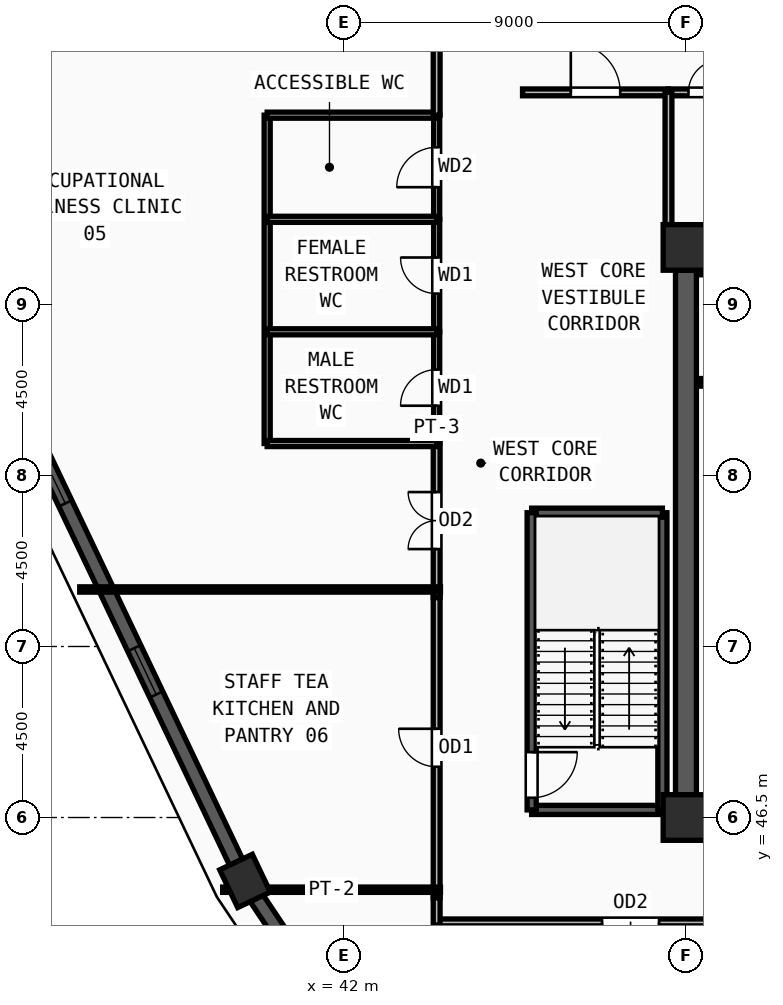
"""IFC4 building model, lengths in metres.
Left out: names, types, materials, properties, quantities, classifications, styles, units other than length and angle.
Written with IfcOpenShell. Run it as: python <this file> out.ifc"""

import sys

from ifc_helpers import new_model, si_unit, direction, frame, frame_2d, origin, origin_2d, place, context, subcontext, project, spatial, rectangle, extrude, source, transform, mapped, element, fill, save


model = new_model("IFC4")
c1 = context("Model", 3, precision=1e-05, world=origin(), true_north=direction((0.0, 1.0)))
c2 = subcontext(c1, "Body", "Model", "MODEL_VIEW")
j1 = project(units=[si_unit("LENGTHUNIT", "METRE"), si_unit("PLANEANGLEUNIT", "RADIAN")], contexts=[c1])
p1 = place(None, origin())
s1 = spatial("IfcSite", under=j1, at=p1, CompositionType="ELEMENT")
p2 = place(p1, origin())
s2 = spatial("IfcBuilding", under=s1, at=p2, CompositionType="ELEMENT")
p3 = place(p2, frame((0.0, 0.0, 286.5)))
s3 = spatial("IfcBuildingStorey", under=s2, at=p3, CompositionType="ELEMENT", Elevation=286.5)
m1 = source(origin(), c2, "Body", "SweptSolid", [
    extrude(rectangle(XDim=1.2, YDim=1.2, at=origin_2d()), origin(), (0.0, 0.0, 1.0), 3.75),
])
for number, where, z_axis, x_axis in (
    (1, (51.0, 46.5, 0.0), (0.0, 0.0, 1.0), (1.0, 0.0, 0.0)),
    (2, (51.0, 61.5, 0.0), (0.0, 0.0, 1.0), (1.0, 0.0, 0.0)),
):
    element("IfcColumn", number, at=place(p3, frame(where, z_axis=z_axis, x_axis=x_axis)), inside=s3, PredefinedType="COLUMN", context=c2, shape_type="MappedRepresentation", body=[
        mapped(m1, transform((0.0, 0.0, 0.0), x_axis=(1.0, 0.0, 0.0), y_axis=(0.0, 1.0, 0.0), z_axis=(0.0, 0.0, 1.0), scale=1.0)),
    ])
m2 = source(origin(), c2, "Body", "SweptSolid", [
    extrude(rectangle(XDim=1.1, YDim=0.95, at=origin_2d()), origin(), (0.0, 0.0, 1.0), 3.75),
])
p4 = place(p3, frame((39.397, 44.831, 0.0), z_axis=(0.0, 0.0, 1.0), x_axis=(-0.429880868547, 0.902885617815, 0.0)))
e3 = element("IfcColumn", 3, at=p4, inside=s3, PredefinedType="COLUMN", context=c2, shape_type="MappedRepresentation", body=[
    mapped(m2, transform((0.0, 0.0, 0.0), x_axis=(1.0, 0.0, 0.0), y_axis=(0.0, 1.0, 0.0), z_axis=(0.0, 0.0, 1.0), scale=1.0)),
])
p5 = place(p3, frame((29.59, 65.429, 0.0), z_axis=(0.0, 0.0, 1.0), x_axis=(0.429890605998, -0.902880981567, 0.0)))
e4 = element("IfcWall", 4, at=p5, inside=s3, PredefinedType="SOLIDWALL", context=c2, shape_type="SweptSolid", body=[
    extrude(rectangle(XDim=22.273, YDim=0.38, at=frame_2d((11.136, 0.0))), origin(), (0.0, 0.0, 1.0), 3.57),
])
m3 = source(origin(), c2, "Body", "SweptSolid", [
    extrude(rectangle(XDim=1.35, YDim=1.85, at=frame_2d((0.675, 0.925))), frame((0.0, 0.2, 0.0), z_axis=(0.0, -1.0, 0.0), x_axis=(1.0, 0.0, 0.0)), (0.0, 0.0, 1.0), 0.4),
])
p6 = place(p5, frame((4.893, 0.0, 0.55)))
e5 = element("IfcOpeningElement", 5, at=p6, cuts=e4, PredefinedType="OPENING", context=c2, shape_type="MappedRepresentation", body=[
    mapped(m3, transform((0.0, 0.0, 0.0), x_axis=(1.0, 0.0, 0.0), y_axis=(0.0, 1.0, 0.0), z_axis=(0.0, 0.0, 1.0), scale=1.0)),
])
p7 = place(p5, frame((10.462, 0.0, 0.55)))
e6 = element("IfcOpeningElement", 6, at=p7, cuts=e4, PredefinedType="OPENING", context=c2, shape_type="MappedRepresentation", body=[
    mapped(m3, transform((0.0, 0.0, 0.0), x_axis=(1.0, 0.0, 0.0), y_axis=(0.0, 1.0, 0.0), z_axis=(0.0, 0.0, 1.0), scale=1.0)),
])
p8 = place(p5, frame((16.03, 0.0, 0.55)))
e7 = element("IfcOpeningElement", 7, at=p8, cuts=e4, PredefinedType="OPENING", context=c2, shape_type="MappedRepresentation", body=[
    mapped(m3, transform((0.0, 0.0, 0.0), x_axis=(1.0, 0.0, 0.0), y_axis=(0.0, 1.0, 0.0), z_axis=(0.0, 0.0, 1.0), scale=1.0)),
])
p9 = place(p3, frame((39.697, 44.382, 0.0), z_axis=(0.0, 0.0, 1.0), x_axis=(0.556246250685, -0.831017514014, 0.0)))
e8 = element("IfcWall", 8, at=p9, inside=s3, PredefinedType="SOLIDWALL", context=c2, shape_type="SweptSolid", body=[
    extrude(rectangle(XDim=26.986, YDim=0.38, at=frame_2d((13.493, 0.0))), origin(), (0.0, 0.0, 1.0), 3.57),
])
p10 = place(p9, frame((6.072, 0.0, 0.55)))
e9 = element("IfcOpeningElement", 9, at=p10, cuts=e8, PredefinedType="OPENING", context=c2, shape_type="MappedRepresentation", body=[
    mapped(m3, transform((0.0, 0.0, 0.0), x_axis=(1.0, 0.0, 0.0), y_axis=(0.0, 1.0, 0.0), z_axis=(0.0, 0.0, 1.0), scale=1.0)),
])
p11 = place(p9, frame((12.818, 0.0, 0.55)))
e10 = element("IfcOpeningElement", 10, at=p11, cuts=e8, PredefinedType="OPENING", context=c2, shape_type="MappedRepresentation", body=[
    mapped(m3, transform((0.0, 0.0, 0.0), x_axis=(1.0, 0.0, 0.0), y_axis=(0.0, 1.0, 0.0), z_axis=(0.0, 0.0, 1.0), scale=1.0)),
])
p12 = place(p9, frame((19.565, 0.0, 0.55)))
e11 = element("IfcOpeningElement", 11, at=p12, cuts=e8, PredefinedType="OPENING", context=c2, shape_type="MappedRepresentation", body=[
    mapped(m3, transform((0.0, 0.0, 0.0), x_axis=(1.0, 0.0, 0.0), y_axis=(0.0, 1.0, 0.0), z_axis=(0.0, 0.0, 1.0), scale=1.0)),
])
p13 = place(p3, frame((51.0, 47.1, 0.0), z_axis=(0.0, 0.0, 1.0), x_axis=(0.0, 1.0, 0.0)))
e12 = element("IfcWall", 12, at=p13, inside=s3, PredefinedType="SHEAR", context=c2, shape_type="SweptSolid", body=[
    extrude(rectangle(XDim=13.8, YDim=0.55, at=frame_2d((6.9, 0.0))), origin(), (0.0, 0.0, 1.0), 3.57),
])
p14 = place(p3, frame((46.94, 46.7, 0.0), z_axis=(0.0, 0.0, 1.0), x_axis=(1.0, 0.0, 0.0)))
e13 = element("IfcWall", 13, at=p14, inside=s3, PredefinedType="SOLIDWALL", context=c2, shape_type="SweptSolid", body=[
    extrude(rectangle(XDim=3.44, YDim=0.24, at=frame_2d((1.72, 0.0))), origin(), (0.0, 0.0, 1.0), 3.57),
])
p15 = place(p3, frame((50.38, 46.7, 0.0), z_axis=(0.0, 0.0, 1.0), x_axis=(0.0, 1.0, 0.0)))
e14 = element("IfcWall", 14, at=p15, inside=s3, PredefinedType="SOLIDWALL", context=c2, shape_type="SweptSolid", body=[
    extrude(rectangle(XDim=7.82, YDim=0.24, at=frame_2d((3.91, 0.0))), origin(), (0.0, 0.0, 1.0), 3.57),
])
p16 = place(p3, frame((50.38, 54.52, 0.0), z_axis=(0.0, 0.0, 1.0), x_axis=(-1.0, 0.0, 0.0)))
e15 = element("IfcWall", 15, at=p16, inside=s3, PredefinedType="SOLIDWALL", context=c2, shape_type="SweptSolid", body=[
    extrude(rectangle(XDim=3.44, YDim=0.24, at=frame_2d((1.72, 0.0))), origin(), (0.0, 0.0, 1.0), 3.57),
])
p17 = place(p3, frame((46.94, 54.52, 0.0), z_axis=(0.0, 0.0, 1.0), x_axis=(0.0, -1.0, 0.0)))
e16 = element("IfcWall", 16, at=p17, inside=s3, PredefinedType="SOLIDWALL", context=c2, shape_type="SweptSolid", body=[
    extrude(rectangle(XDim=7.82, YDim=0.24, at=frame_2d((3.91, 0.0))), origin(), (0.0, 0.0, 1.0), 3.57),
])
m4 = source(origin(), c2, "Body", "SweptSolid", [
    extrude(rectangle(XDim=1.2, YDim=2.2, at=frame_2d((0.6, 1.1))), frame((0.0, 0.13, 0.0), z_axis=(0.0, -1.0, 0.0), x_axis=(1.0, 0.0, 0.0)), (0.0, 0.0, 1.0), 0.26),
])
p18 = place(p17, frame((6.3, 0.0, 0.0)))
e17 = element("IfcOpeningElement", 17, at=p18, cuts=e16, PredefinedType="OPENING", context=c2, shape_type="MappedRepresentation", body=[
    mapped(m4, transform((0.0, 0.0, 0.0), x_axis=(1.0, 0.0, 0.0), y_axis=(0.0, 1.0, 0.0), z_axis=(0.0, 0.0, 1.0), scale=1.0)),
])
for number, where, z_axis, x_axis in (
    (18, (51.4, 57.95, 0.0), (0.0, 0.0, 1.0), (1.0, 0.0, 0.0)),
    (19, (53.8, 60.88, 0.0), (0.0, 0.0, 1.0), (-1.0, 0.0, 0.0)),
):
    element("IfcWall", number, at=place(p3, frame(where, z_axis=z_axis, x_axis=x_axis)), inside=s3, PredefinedType="SOLIDWALL", context=c2, shape_type="SweptSolid", body=[
        extrude(rectangle(XDim=2.4, YDim=0.2, at=frame_2d((1.2, 0.0))), origin(), (0.0, 0.0, 1.0), 3.57),
    ])
p19 = place(p3, frame((44.44, 56.34, 0.0), z_axis=(0.0, 0.0, 1.0), x_axis=(0.0, 1.0, 0.0)))
e20 = element("IfcWall", 20, at=p19, inside=s3, PredefinedType="PARTITIONING", context=c2, shape_type="SweptSolid", body=[
    extrude(rectangle(XDim=2.94, YDim=0.16, at=frame_2d((1.47, 0.0))), origin(), (0.0, 0.0, 1.0), 3.57),
])
m5 = source(origin(), c2, "Body", "SweptSolid", [
    extrude(rectangle(XDim=0.95, YDim=2.15, at=frame_2d((0.475, 1.075))), frame((0.0, 0.09, 0.0), z_axis=(0.0, -1.0, 0.0), x_axis=(1.0, 0.0, 0.0)), (0.0, 0.0, 1.0), 0.18),
])
p20 = place(p19, frame((0.995, 0.0, 0.0)))
e21 = element("IfcOpeningElement", 21, at=p20, cuts=e20, PredefinedType="OPENING", context=c2, shape_type="MappedRepresentation", body=[
    mapped(m5, transform((0.0, 0.0, 0.0), x_axis=(1.0, 0.0, 0.0), y_axis=(0.0, 1.0, 0.0), z_axis=(0.0, 0.0, 1.0), scale=1.0)),
])
p21 = place(p3, frame((44.44, 59.28, 0.0), z_axis=(0.0, 0.0, 1.0), x_axis=(0.0, 1.0, 0.0)))
e22 = element("IfcWall", 22, at=p21, inside=s3, PredefinedType="PARTITIONING", context=c2, shape_type="SweptSolid", body=[
    extrude(rectangle(XDim=2.96, YDim=0.16, at=frame_2d((1.48, 0.0))), origin(), (0.0, 0.0, 1.0), 3.57),
])
p22 = place(p21, frame((1.005, 0.0, 0.0)))
e23 = element("IfcOpeningElement", 23, at=p22, cuts=e22, PredefinedType="OPENING", context=c2, shape_type="MappedRepresentation", body=[
    mapped(m5, transform((0.0, 0.0, 0.0), x_axis=(1.0, 0.0, 0.0), y_axis=(0.0, 1.0, 0.0), z_axis=(0.0, 0.0, 1.0), scale=1.0)),
])
p23 = place(p3, frame((44.44, 62.24, 0.0), z_axis=(0.0, 0.0, 1.0), x_axis=(0.0, 1.0, 0.0)))
e24 = element("IfcWall", 24, at=p23, inside=s3, PredefinedType="PARTITIONING", context=c2, shape_type="SweptSolid", body=[
    extrude(rectangle(XDim=2.74, YDim=0.16, at=frame_2d((1.37, 0.0))), origin(), (0.0, 0.0, 1.0), 3.57),
])
m6 = source(origin(), c2, "Body", "SweptSolid", [
    extrude(rectangle(XDim=1.05, YDim=2.15, at=frame_2d((0.525, 1.075))), frame((0.0, 0.09, 0.0), z_axis=(0.0, -1.0, 0.0), x_axis=(1.0, 0.0, 0.0)), (0.0, 0.0, 1.0), 0.18),
])
p24 = place(p23, frame((0.845, 0.0, 0.0)))
e25 = element("IfcOpeningElement", 25, at=p24, cuts=e24, PredefinedType="OPENING", context=c2, shape_type="MappedRepresentation", body=[
    mapped(m6, transform((0.0, 0.0, 0.0), x_axis=(1.0, 0.0, 0.0), y_axis=(0.0, 1.0, 0.0), z_axis=(0.0, 0.0, 1.0), scale=1.0)),
])
p25 = place(p3, frame((50.54, 65.58, 0.0), z_axis=(0.0, 0.0, 1.0), x_axis=(1.0, 0.0, 0.0)))
e26 = element("IfcWall", 26, at=p25, inside=s3, PredefinedType="PARTITIONING", context=c2, shape_type="SweptSolid", body=[
    extrude(rectangle(XDim=1.9, YDim=0.18, at=frame_2d((0.95, 0.0))), origin(), (0.0, 0.0, 1.0), 3.57),
])
m7 = source(origin(), c2, "Body", "SweptSolid", [
    extrude(rectangle(XDim=0.85, YDim=2.1, at=frame_2d((0.425, 1.05))), frame((0.0, 0.1, 0.0), z_axis=(0.0, -1.0, 0.0), x_axis=(1.0, 0.0, 0.0)), (0.0, 0.0, 1.0), 0.2),
])
p26 = place(p25, frame((0.525, 0.0, 0.0)))
e27 = element("IfcOpeningElement", 27, at=p26, cuts=e26, PredefinedType="OPENING", context=c2, shape_type="MappedRepresentation", body=[
    mapped(m7, transform((0.0, 0.0, 0.0), x_axis=(1.0, 0.0, 0.0), y_axis=(0.0, 1.0, 0.0), z_axis=(0.0, 0.0, 1.0), scale=1.0)),
])
p27 = place(p3, frame((46.7, 65.58, 0.0), z_axis=(0.0, 0.0, 1.0), x_axis=(1.0, 0.0, 0.0)))
e28 = element("IfcWall", 28, at=p27, inside=s3, PredefinedType="PARTITIONING", context=c2, shape_type="SweptSolid", body=[
    extrude(rectangle(XDim=3.84, YDim=0.18, at=frame_2d((1.92, 0.0))), origin(), (0.0, 0.0, 1.0), 3.57),
])
m8 = source(origin(), c2, "Body", "SweptSolid", [
    extrude(rectangle(XDim=1.3, YDim=2.2, at=frame_2d((0.65, 1.1))), frame((0.0, 0.1, 0.0), z_axis=(0.0, -1.0, 0.0), x_axis=(1.0, 0.0, 0.0)), (0.0, 0.0, 1.0), 0.2),
])
p28 = place(p27, frame((1.27, 0.0, 0.0)))
e29 = element("IfcOpeningElement", 29, at=p28, cuts=e28, PredefinedType="OPENING", context=c2, shape_type="MappedRepresentation", body=[
    mapped(m8, transform((0.0, 0.0, 0.0), x_axis=(1.0, 0.0, 0.0), y_axis=(0.0, 1.0, 0.0), z_axis=(0.0, 0.0, 1.0), scale=1.0)),
])
p29 = place(p3, frame((44.44, 52.285, 0.0), z_axis=(0.0, 0.0, 1.0), x_axis=(0.0, 1.0, 0.0)))
e30 = element("IfcWall", 30, at=p29, inside=s3, PredefinedType="PARTITIONING", context=c2, shape_type="SweptSolid", body=[
    extrude(rectangle(XDim=4.055, YDim=0.18, at=frame_2d((2.028, 0.0))), origin(), (0.0, 0.0, 1.0), 3.261),
])
m9 = source(origin(), c2, "Body", "SweptSolid", [
    extrude(rectangle(XDim=1.5, YDim=2.2, at=frame_2d((0.75, 1.1))), frame((0.0, 0.1, 0.0), z_axis=(0.0, -1.0, 0.0), x_axis=(1.0, 0.0, 0.0)), (0.0, 0.0, 1.0), 0.2),
])
p30 = place(p29, frame((1.278, 0.0, 0.0)))
e31 = element("IfcOpeningElement", 31, at=p30, cuts=e30, PredefinedType="OPENING", context=c2, shape_type="MappedRepresentation", body=[
    mapped(m9, transform((0.0, 0.0, 0.0), x_axis=(1.0, 0.0, 0.0), y_axis=(0.0, 1.0, 0.0), z_axis=(0.0, 0.0, 1.0), scale=1.0)),
])
p31 = place(p3, frame((44.44, 44.385, 0.0), z_axis=(0.0, 0.0, 1.0), x_axis=(0.0, 1.0, 0.0)))
e32 = element("IfcWall", 32, at=p31, inside=s3, PredefinedType="PARTITIONING", context=c2, shape_type="SweptSolid", body=[
    extrude(rectangle(XDim=7.9, YDim=0.18, at=frame_2d((3.95, 0.0))), origin(), (0.0, 0.0, 1.0), 3.57),
])
m10 = source(origin(), c2, "Body", "SweptSolid", [
    extrude(rectangle(XDim=1.0, YDim=2.2, at=frame_2d((0.5, 1.1))), frame((0.0, 0.1, 0.0), z_axis=(0.0, -1.0, 0.0), x_axis=(1.0, 0.0, 0.0)), (0.0, 0.0, 1.0), 0.2),
])
p32 = place(p31, frame((3.45, 0.0, 0.0)))
e33 = element("IfcOpeningElement", 33, at=p32, cuts=e32, PredefinedType="OPENING", context=c2, shape_type="MappedRepresentation", body=[
    mapped(m10, transform((0.0, 0.0, 0.0), x_axis=(1.0, 0.0, 0.0), y_axis=(0.0, 1.0, 0.0), z_axis=(0.0, 0.0, 1.0), scale=1.0)),
])
p33 = place(p3, frame((54.715, 43.74, 0.0), z_axis=(0.0, 0.0, 1.0), x_axis=(-1.0, 0.0, 0.0)))
e34 = element("IfcWall", 34, at=p33, inside=s3, PredefinedType="PARTITIONING", context=c2, shape_type="SweptSolid", body=[
    extrude(rectangle(XDim=10.345, YDim=0.18, at=frame_2d((5.172, 0.0))), origin(), (0.0, 0.0, 1.0), 3.57),
])
p34 = place(p33, frame((4.423, 0.0, 0.0)))
e35 = element("IfcOpeningElement", 35, at=p34, cuts=e34, PredefinedType="OPENING", context=c2, shape_type="MappedRepresentation", body=[
    mapped(m9, transform((0.0, 0.0, 0.0), x_axis=(1.0, 0.0, 0.0), y_axis=(0.0, 1.0, 0.0), z_axis=(0.0, 0.0, 1.0), scale=1.0)),
])
p35 = place(p3, frame((39.98, 56.34, 0.0), z_axis=(0.0, 0.0, 1.0), x_axis=(0.0, 1.0, 0.0)))
e36 = element("IfcWall", 36, at=p35, inside=s3, PredefinedType="PARTITIONING", context=c2, shape_type="SweptSolid", body=[
    extrude(rectangle(XDim=8.64, YDim=0.16, at=frame_2d((4.32, 0.0))), origin(), (0.0, 0.0, 1.0), 3.57),
])
for number, where, z_axis, x_axis in (
    (37, (39.98, 56.34, 0.0), (0.0, 0.0, 1.0), (1.0, 0.0, 0.0)),
    (38, (39.98, 59.28, 0.0), (0.0, 0.0, 1.0), (1.0, 0.0, 0.0)),
    (39, (39.98, 62.24, 0.0), (0.0, 0.0, 1.0), (1.0, 0.0, 0.0)),
    (40, (39.98, 64.98, 0.0), (0.0, 0.0, 1.0), (1.0, 0.0, 0.0)),
):
    element("IfcWall", number, at=place(p3, frame(where, z_axis=z_axis, x_axis=x_axis)), inside=s3, PredefinedType="PARTITIONING", context=c2, shape_type="SweptSolid", body=[
        extrude(rectangle(XDim=4.46, YDim=0.16, at=frame_2d((2.23, 0.0))), origin(), (0.0, 0.0, 1.0), 3.57),
    ])
p36 = place(p3, frame((50.54, 61.95, 0.0), z_axis=(0.0, 0.0, 1.0), x_axis=(0.0, 1.0, 0.0)))
e41 = element("IfcWall", 41, at=p36, inside=s3, PredefinedType="PARTITIONING", context=c2, shape_type="SweptSolid", body=[
    extrude(rectangle(XDim=3.63, YDim=0.18, at=frame_2d((1.815, 0.0))), origin(), (0.0, 0.0, 1.0), 3.57),
])
p37 = place(p3, frame((44.44, 64.98, 0.0), z_axis=(0.0, 0.0, 1.0), x_axis=(0.0, 1.0, 0.0)))
e42 = element("IfcWall", 42, at=p37, inside=s3, PredefinedType="PARTITIONING", context=c2, shape_type="SweptSolid", body=[
    extrude(rectangle(XDim=1.805, YDim=0.18, at=frame_2d((0.902, 0.0))), origin(), (0.0, 0.0, 1.0), 3.57),
])
p38 = place(p3, frame((44.44, 43.67, 0.0), z_axis=(0.0, 0.0, 1.0), x_axis=(0.0, 1.0, 0.0)))
e43 = element("IfcWall", 43, at=p38, inside=s3, PredefinedType="PARTITIONING", context=c2, shape_type="SweptSolid", body=[
    extrude(rectangle(XDim=0.715, YDim=0.18, at=frame_2d((0.357, 0.0))), origin(), (0.0, 0.0, 1.0), 3.57),
])
p39 = place(p3, frame((44.54, 44.6, 0.0), z_axis=(0.0, 0.0, 1.0), x_axis=(-1.0, 0.0, 0.0)))
e44 = element("IfcWall", 44, at=p39, inside=s3, PredefinedType="PARTITIONING", context=c2, shape_type="SweptSolid", body=[
    extrude(rectangle(XDim=5.731, YDim=0.14, at=frame_2d((2.865, 0.0))), origin(), (0.0, 0.0, 1.0), 3.57),
])
p40 = place(p3, frame((44.54, 52.5, 0.0), z_axis=(0.0, 0.0, 1.0), x_axis=(-1.0, 0.0, 0.0)))
e45 = element("IfcWall", 45, at=p40, inside=s3, PredefinedType="PARTITIONING", context=c2, shape_type="SweptSolid", body=[
    extrude(rectangle(XDim=9.492, YDim=0.14, at=frame_2d((4.746, 0.0))), origin(), (0.0, 0.0, 1.0), 3.57),
])
m11 = source(origin(), c2, "Body", "SweptSolid", [
    extrude(rectangle(XDim=1.35, YDim=1.85, at=frame_2d((0.675, 0.925))), frame((0.0, 0.03, 0.0), z_axis=(0.0, -1.0, 0.0), x_axis=(1.0, 0.0, 0.0)), (0.0, 0.0, 1.0), 0.06),
])
p41 = place(p7, origin())
e46 = element("IfcWindow", 46, at=p41, inside=s3, PartitioningType="SINGLE_PANEL", PredefinedType="WINDOW", context=c2, shape_type="MappedRepresentation", body=[
    mapped(m11, transform((0.0, 0.0, 0.0), x_axis=(1.0, 0.0, 0.0), y_axis=(0.0, 1.0, 0.0), z_axis=(0.0, 0.0, 1.0), scale=1.0)),
])
fill(e6, e46)
p42 = place(p8, origin())
e47 = element("IfcWindow", 47, at=p42, inside=s3, PartitioningType="SINGLE_PANEL", PredefinedType="WINDOW", context=c2, shape_type="MappedRepresentation", body=[
    mapped(m11, transform((0.0, 0.0, 0.0), x_axis=(1.0, 0.0, 0.0), y_axis=(0.0, 1.0, 0.0), z_axis=(0.0, 0.0, 1.0), scale=1.0)),
])
fill(e7, e47)
m12 = source(origin(), c2, "Body", "SweptSolid", [
    extrude(rectangle(XDim=1.2, YDim=2.2, at=frame_2d((0.6, 1.1))), frame((0.0, 0.025, 0.0), z_axis=(0.0, -1.0, 0.0), x_axis=(1.0, 0.0, 0.0)), (0.0, 0.0, 1.0), 0.05),
])
p43 = place(p18, origin())
e48 = element("IfcDoor", 48, at=p43, inside=s3, OperationType="SINGLE_SWING_LEFT", PredefinedType="DOOR", context=c2, shape_type="MappedRepresentation", body=[
    mapped(m12, transform((0.0, 0.0, 0.0), x_axis=(1.0, 0.0, 0.0), y_axis=(0.0, 1.0, 0.0), z_axis=(0.0, 0.0, 1.0), scale=1.0)),
])
fill(e17, e48)
m13 = source(origin(), c2, "Body", "SweptSolid", [
    extrude(rectangle(XDim=0.95, YDim=2.15, at=frame_2d((0.475, 1.075))), frame((0.0, 0.025, 0.0), z_axis=(0.0, -1.0, 0.0), x_axis=(1.0, 0.0, 0.0)), (0.0, 0.0, 1.0), 0.05),
])
p44 = place(p20, origin())
e49 = element("IfcDoor", 49, at=p44, inside=s3, OperationType="SINGLE_SWING_LEFT", PredefinedType="DOOR", context=c2, shape_type="MappedRepresentation", body=[
    mapped(m13, transform((0.0, 0.0, 0.0), x_axis=(1.0, 0.0, 0.0), y_axis=(0.0, 1.0, 0.0), z_axis=(0.0, 0.0, 1.0), scale=1.0)),
])
fill(e21, e49)
p45 = place(p22, origin())
e50 = element("IfcDoor", 50, at=p45, inside=s3, OperationType="SINGLE_SWING_RIGHT", PredefinedType="DOOR", context=c2, shape_type="MappedRepresentation", body=[
    mapped(m13, transform((0.0, 0.0, 0.0), x_axis=(1.0, 0.0, 0.0), y_axis=(0.0, 1.0, 0.0), z_axis=(0.0, 0.0, 1.0), scale=1.0)),
])
fill(e23, e50)
m14 = source(origin(), c2, "Body", "SweptSolid", [
    extrude(rectangle(XDim=1.05, YDim=2.15, at=frame_2d((0.525, 1.075))), frame((0.0, 0.025, 0.0), z_axis=(0.0, -1.0, 0.0), x_axis=(1.0, 0.0, 0.0)), (0.0, 0.0, 1.0), 0.05),
])
p46 = place(p24, origin())
e51 = element("IfcDoor", 51, at=p46, inside=s3, OperationType="SINGLE_SWING_LEFT", PredefinedType="DOOR", context=c2, shape_type="MappedRepresentation", body=[
    mapped(m14, transform((0.0, 0.0, 0.0), x_axis=(1.0, 0.0, 0.0), y_axis=(0.0, 1.0, 0.0), z_axis=(0.0, 0.0, 1.0), scale=1.0)),
])
fill(e25, e51)
m15 = source(origin(), c2, "Body", "SweptSolid", [
    extrude(rectangle(XDim=0.85, YDim=2.1, at=frame_2d((0.425, 1.05))), frame((0.0, 0.025, 0.0), z_axis=(0.0, -1.0, 0.0), x_axis=(1.0, 0.0, 0.0)), (0.0, 0.0, 1.0), 0.05),
])
p47 = place(p26, origin())
e52 = element("IfcDoor", 52, at=p47, inside=s3, OperationType="SINGLE_SWING_RIGHT", PredefinedType="DOOR", context=c2, shape_type="MappedRepresentation", body=[
    mapped(m15, transform((0.0, 0.0, 0.0), x_axis=(1.0, 0.0, 0.0), y_axis=(0.0, 1.0, 0.0), z_axis=(0.0, 0.0, 1.0), scale=1.0)),
])
fill(e27, e52)
m16 = source(origin(), c2, "Body", "SweptSolid", [
    extrude(rectangle(XDim=1.3, YDim=2.2, at=frame_2d((0.65, 1.1))), frame((0.0, 0.025, 0.0), z_axis=(0.0, -1.0, 0.0), x_axis=(1.0, 0.0, 0.0)), (0.0, 0.0, 1.0), 0.05),
])
p48 = place(p28, origin())
e53 = element("IfcDoor", 53, at=p48, inside=s3, OperationType="SINGLE_SWING_LEFT", PredefinedType="DOOR", context=c2, shape_type="MappedRepresentation", body=[
    mapped(m16, transform((0.0, 0.0, 0.0), x_axis=(1.0, 0.0, 0.0), y_axis=(0.0, 1.0, 0.0), z_axis=(0.0, 0.0, 1.0), scale=1.0)),
])
fill(e29, e53)
m17 = source(origin(), c2, "Body", "SweptSolid", [
    extrude(rectangle(XDim=1.5, YDim=2.2, at=frame_2d((0.75, 1.1))), frame((0.0, 0.025, 0.0), z_axis=(0.0, -1.0, 0.0), x_axis=(1.0, 0.0, 0.0)), (0.0, 0.0, 1.0), 0.05),
])
p49 = place(p30, origin())
e54 = element("IfcDoor", 54, at=p49, inside=s3, OperationType="DOUBLE_DOOR_SINGLE_SWING", PredefinedType="DOOR", context=c2, shape_type="MappedRepresentation", body=[
    mapped(m17, transform((0.0, 0.0, 0.0), x_axis=(1.0, 0.0, 0.0), y_axis=(0.0, 1.0, 0.0), z_axis=(0.0, 0.0, 1.0), scale=1.0)),
])
fill(e31, e54)
m18 = source(origin(), c2, "Body", "SweptSolid", [
    extrude(rectangle(XDim=1.0, YDim=2.2, at=frame_2d((0.5, 1.1))), frame((0.0, 0.025, 0.0), z_axis=(0.0, -1.0, 0.0), x_axis=(1.0, 0.0, 0.0)), (0.0, 0.0, 1.0), 0.05),
])
p50 = place(p32, origin())
e55 = element("IfcDoor", 55, at=p50, inside=s3, OperationType="SINGLE_SWING_RIGHT", PredefinedType="DOOR", context=c2, shape_type="MappedRepresentation", body=[
    mapped(m18, transform((0.0, 0.0, 0.0), x_axis=(1.0, 0.0, 0.0), y_axis=(0.0, 1.0, 0.0), z_axis=(0.0, 0.0, 1.0), scale=1.0)),
])
fill(e33, e55)
p51 = place(p34, origin())
e56 = element("IfcDoor", 56, at=p51, inside=s3, OperationType="DOUBLE_DOOR_SINGLE_SWING", PredefinedType="DOOR", context=c2, shape_type="MappedRepresentation", body=[
    mapped(m17, transform((0.0, 0.0, 0.0), x_axis=(1.0, 0.0, 0.0), y_axis=(0.0, 1.0, 0.0), z_axis=(0.0, 0.0, 1.0), scale=1.0)),
])
fill(e35, e56)
save(model, sys.argv[1])
